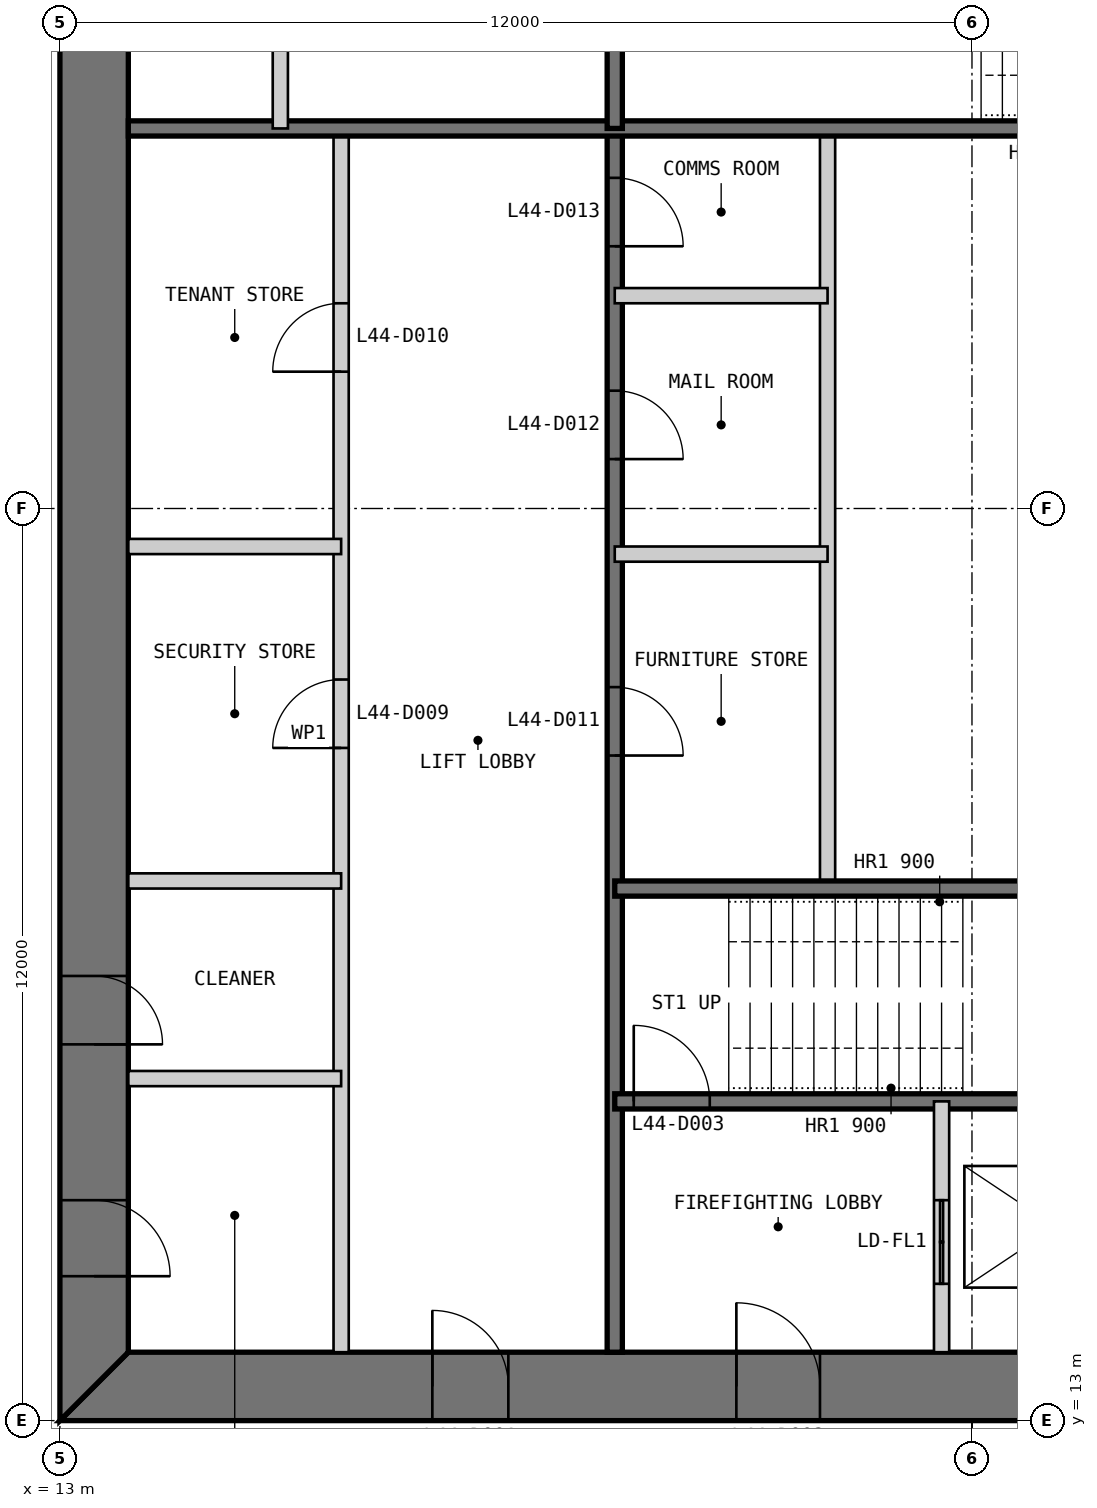
"""IFC4 building model, lengths in metres.
Left out: names, types, materials, properties, quantities, classifications, styles, units other than length and angle.
Written with IfcOpenShell. Run it as: python <this file> out.ifc"""

import sys

from ifc_helpers import new_model, si_unit, direction, frame, frame_2d, origin, place, context, subcontext, project, spatial, polyline, rectangle, outline, extrude, element, fill, save


model = new_model("IFC4")
c1 = context("Model", 3, precision=1e-05, world=origin(), true_north=direction((0.0, 1.0)))
c2 = subcontext(c1, "Body", "Model", "MODEL_VIEW")
j1 = project(units=[si_unit("LENGTHUNIT", "METRE"), si_unit("PLANEANGLEUNIT", "RADIAN")], contexts=[c1])
p1 = place(None, origin())
s1 = spatial("IfcSite", under=j1, at=p1, CompositionType="ELEMENT")
p2 = place(p1, origin())
s2 = spatial("IfcBuilding", under=s1, at=p2, CompositionType="ELEMENT")
p3 = place(p2, frame((0.0, 0.0, 189.8)))
s3 = spatial("IfcBuildingStorey", under=s2, at=p3, CompositionType="ELEMENT", Elevation=189.8)
p4 = place(p3, frame((13.0, 13.45, 0.0), z_axis=(0.0, 0.0, 1.0), x_axis=(1.0, 0.0, 0.0)))
e1 = element("IfcWall", 1, at=p4, inside=s3, PredefinedType="SHEAR", context=c2, shape_type="SweptSolid", body=[
    extrude(outline(polyline([(0.0, -0.45), (24.0, -0.45), (23.1, 0.45), (0.9, 0.45), (0.0, -0.45)])), origin(), (0.0, 0.0, 1.0), 4.0),
])
p5 = place(p4, frame((4.9, 0.0, 0.0)))
e2 = element("IfcOpeningElement", 2, at=p5, cuts=e1, PredefinedType="OPENING", context=c2, shape_type="SweptSolid", body=[
    extrude(rectangle(XDim=1.0, YDim=2.2, at=frame_2d((0.5, 1.1))), frame((0.0, 0.46, 0.0), z_axis=(0.0, -1.0, 0.0), x_axis=(1.0, 0.0, 0.0)), (0.0, 0.0, 1.0), 0.92),
])
p6 = place(p4, frame((8.9, 0.0, 0.0)))
e3 = element("IfcOpeningElement", 3, at=p6, cuts=e1, PredefinedType="OPENING", context=c2, shape_type="SweptSolid", body=[
    extrude(rectangle(XDim=1.1, YDim=2.2, at=frame_2d((0.55, 1.1))), frame((0.0, 0.46, 0.0), z_axis=(0.0, -1.0, 0.0), x_axis=(1.0, 0.0, 0.0)), (0.0, 0.0, 1.0), 0.92),
])
p7 = place(p4, frame((15.05, 0.0, 0.0)))
e4 = element("IfcOpeningElement", 4, at=p7, cuts=e1, PredefinedType="OPENING", context=c2, shape_type="SweptSolid", body=[
    extrude(rectangle(XDim=0.9, YDim=2.2, at=frame_2d((0.45, 1.1))), frame((0.0, 0.46, 0.0), z_axis=(0.0, -1.0, 0.0), x_axis=(1.0, 0.0, 0.0)), (0.0, 0.0, 1.0), 0.92),
])
p8 = place(p4, frame((17.9, 0.0, 0.0)))
e5 = element("IfcOpeningElement", 5, at=p8, cuts=e1, PredefinedType="OPENING", context=c2, shape_type="SweptSolid", body=[
    extrude(rectangle(XDim=1.0, YDim=2.2, at=frame_2d((0.5, 1.1))), frame((0.0, 0.46, 0.0), z_axis=(0.0, -1.0, 0.0), x_axis=(1.0, 0.0, 0.0)), (0.0, 0.0, 1.0), 0.92),
])
p9 = place(p4, frame((21.4, 0.0, 0.0)))
e6 = element("IfcOpeningElement", 6, at=p9, cuts=e1, PredefinedType="OPENING", context=c2, shape_type="SweptSolid", body=[
    extrude(rectangle(XDim=1.0, YDim=2.2, at=frame_2d((0.5, 1.1))), frame((0.0, 0.46, 0.0), z_axis=(0.0, -1.0, 0.0), x_axis=(1.0, 0.0, 0.0)), (0.0, 0.0, 1.0), 0.92),
])
p10 = place(p3, frame((13.45, 36.1, 0.0), z_axis=(0.0, 0.0, 1.0), x_axis=(0.0, -1.0, 0.0)))
e7 = element("IfcWall", 7, at=p10, inside=s3, PredefinedType="SHEAR", context=c2, shape_type="SweptSolid", body=[
    extrude(outline(polyline([(-0.9, -0.45), (23.1, -0.45), (22.2, 0.45), (0.0, 0.45), (-0.9, -0.45)])), origin(), (0.0, 0.0, 1.0), 4.0),
])
p11 = place(p10, frame((20.2, 0.0, 0.0)))
e8 = element("IfcOpeningElement", 8, at=p11, cuts=e7, PredefinedType="OPENING", context=c2, shape_type="SweptSolid", body=[
    extrude(rectangle(XDim=1.0, YDim=2.2, at=frame_2d((0.5, 1.1))), frame((0.0, 0.46, 0.0), z_axis=(0.0, -1.0, 0.0), x_axis=(1.0, 0.0, 0.0)), (0.0, 0.0, 1.0), 0.92),
])
p12 = place(p10, frame((17.25, 0.0, 0.0)))
e9 = element("IfcOpeningElement", 9, at=p12, cuts=e7, PredefinedType="OPENING", context=c2, shape_type="SweptSolid", body=[
    extrude(rectangle(XDim=0.9, YDim=2.2, at=frame_2d((0.45, 1.1))), frame((0.0, 0.46, 0.0), z_axis=(0.0, -1.0, 0.0), x_axis=(1.0, 0.0, 0.0)), (0.0, 0.0, 1.0), 0.92),
])
p13 = place(p3, frame((16.7, 13.9, 0.0), z_axis=(0.0, 0.0, 1.0), x_axis=(0.0, 1.0, 0.0)))
e10 = element("IfcWall", 10, at=p13, inside=s3, PredefinedType="PARTITIONING", context=c2, shape_type="SweptSolid", body=[
    extrude(rectangle(XDim=16.1, YDim=0.2, at=frame_2d((8.05, 0.0))), origin(), (0.0, 0.0, 1.0), 3.8),
])
p14 = place(p13, frame((7.95, 0.0, 0.0)))
e11 = element("IfcOpeningElement", 11, at=p14, cuts=e10, PredefinedType="OPENING", context=c2, shape_type="SweptSolid", body=[
    extrude(rectangle(XDim=0.9, YDim=2.2, at=frame_2d((0.45, 1.1))), frame((0.0, 0.11, 0.0), z_axis=(0.0, -1.0, 0.0), x_axis=(1.0, 0.0, 0.0)), (0.0, 0.0, 1.0), 0.22),
])
p15 = place(p13, frame((12.9, 0.0, 0.0)))
e12 = element("IfcOpeningElement", 12, at=p15, cuts=e10, PredefinedType="OPENING", context=c2, shape_type="SweptSolid", body=[
    extrude(rectangle(XDim=0.9, YDim=2.2, at=frame_2d((0.45, 1.1))), frame((0.0, 0.11, 0.0), z_axis=(0.0, -1.0, 0.0), x_axis=(1.0, 0.0, 0.0)), (0.0, 0.0, 1.0), 0.22),
])
p16 = place(p3, frame((20.3, 13.9, 0.0), z_axis=(0.0, 0.0, 1.0), x_axis=(0.0, 1.0, 0.0)))
e13 = element("IfcWall", 13, at=p16, inside=s3, PredefinedType="SOLIDWALL", context=c2, shape_type="SweptSolid", body=[
    extrude(rectangle(XDim=16.1, YDim=0.2, at=frame_2d((8.05, 0.0))), origin(), (0.0, 0.0, 1.0), 3.8),
])
p17 = place(p16, frame((7.85, 0.0, 0.0)))
e14 = element("IfcOpeningElement", 14, at=p17, cuts=e13, PredefinedType="OPENING", context=c2, shape_type="SweptSolid", body=[
    extrude(rectangle(XDim=0.9, YDim=2.2, at=frame_2d((0.45, 1.1))), frame((0.0, 0.11, 0.0), z_axis=(0.0, -1.0, 0.0), x_axis=(1.0, 0.0, 0.0)), (0.0, 0.0, 1.0), 0.22),
])
p18 = place(p16, frame((11.75, 0.0, 0.0)))
e15 = element("IfcOpeningElement", 15, at=p18, cuts=e13, PredefinedType="OPENING", context=c2, shape_type="SweptSolid", body=[
    extrude(rectangle(XDim=0.9, YDim=2.2, at=frame_2d((0.45, 1.1))), frame((0.0, 0.11, 0.0), z_axis=(0.0, -1.0, 0.0), x_axis=(1.0, 0.0, 0.0)), (0.0, 0.0, 1.0), 0.22),
])
p19 = place(p16, frame((14.55, 0.0, 0.0)))
e16 = element("IfcOpeningElement", 16, at=p19, cuts=e13, PredefinedType="OPENING", context=c2, shape_type="SweptSolid", body=[
    extrude(rectangle(XDim=0.9, YDim=2.2, at=frame_2d((0.45, 1.1))), frame((0.0, 0.11, 0.0), z_axis=(0.0, -1.0, 0.0), x_axis=(1.0, 0.0, 0.0)), (0.0, 0.0, 1.0), 0.22),
])
p20 = place(p3, frame((23.1, 20.0, 0.0), z_axis=(0.0, 0.0, 1.0), x_axis=(0.0, 1.0, 0.0)))
e17 = element("IfcWall", 17, at=p20, inside=s3, PredefinedType="PARTITIONING", context=c2, shape_type="SweptSolid", body=[
    extrude(rectangle(XDim=10.0, YDim=0.2, at=frame_2d((5.0, 0.0))), origin(), (0.0, 0.0, 1.0), 3.8),
])
p21 = place(p3, frame((20.3, 17.2, 0.0), z_axis=(0.0, 0.0, 1.0), x_axis=(1.0, 0.0, 0.0)))
e18 = element("IfcWall", 18, at=p21, inside=s3, PredefinedType="SOLIDWALL", context=c2, shape_type="SweptSolid", body=[
    extrude(rectangle(XDim=9.4, YDim=0.2, at=frame_2d((4.7, 0.0))), origin(), (0.0, 0.0, 1.0), 3.8),
])
p22 = place(p21, frame((0.25, 0.0, 0.0)))
e19 = element("IfcOpeningElement", 19, at=p22, cuts=e18, PredefinedType="OPENING", context=c2, shape_type="SweptSolid", body=[
    extrude(rectangle(XDim=1.0, YDim=2.2, at=frame_2d((0.5, 1.1))), frame((0.0, 0.11, 0.0), z_axis=(0.0, -1.0, 0.0), x_axis=(1.0, 0.0, 0.0)), (0.0, 0.0, 1.0), 0.22),
])
p23 = place(p3, frame((20.3, 20.0, 0.0), z_axis=(0.0, 0.0, 1.0), x_axis=(1.0, 0.0, 0.0)))
e20 = element("IfcWall", 20, at=p23, inside=s3, PredefinedType="SOLIDWALL", context=c2, shape_type="SweptSolid", body=[
    extrude(rectangle(XDim=15.8, YDim=0.2, at=frame_2d((7.9, 0.0))), origin(), (0.0, 0.0, 1.0), 3.8),
])
p24 = place(p3, frame((24.6, 13.9, 0.0), z_axis=(0.0, 0.0, 1.0), x_axis=(0.0, 1.0, 0.0)))
e21 = element("IfcWall", 21, at=p24, inside=s3, PredefinedType="PARTITIONING", context=c2, shape_type="SweptSolid", body=[
    extrude(rectangle(XDim=3.3, YDim=0.2, at=frame_2d((1.65, 0.0))), origin(), (0.0, 0.0, 1.0), 3.8),
])
p25 = place(p24, frame((0.9, 0.0, 0.0)))
e22 = element("IfcOpeningElement", 22, at=p25, cuts=e21, PredefinedType="OPENING", context=c2, shape_type="SweptSolid", body=[
    extrude(rectangle(XDim=1.1, YDim=2.2, at=frame_2d((0.55, 1.1))), frame((0.0, 0.11, 0.0), z_axis=(0.0, -1.0, 0.0), x_axis=(1.0, 0.0, 0.0)), (0.0, 0.0, 1.0), 0.22),
])
for number, where, z_axis, x_axis in (
    (23, (13.9, 17.5, 0.0), (0.0, 0.0, 1.0), (1.0, 0.0, 0.0)),
    (24, (13.9, 20.1, 0.0), (0.0, 0.0, 1.0), (1.0, 0.0, 0.0)),
    (25, (13.9, 24.5, 0.0), (0.0, 0.0, 1.0), (1.0, 0.0, 0.0)),
    (26, (20.3, 24.4, 0.0), (0.0, 0.0, 1.0), (1.0, 0.0, 0.0)),
    (27, (20.3, 27.8, 0.0), (0.0, 0.0, 1.0), (1.0, 0.0, 0.0)),
):
    element("IfcWall", number, at=place(p3, frame(where, z_axis=z_axis, x_axis=x_axis)), inside=s3, PredefinedType="PARTITIONING", context=c2, shape_type="SweptSolid", body=[
        extrude(rectangle(XDim=2.8, YDim=0.2, at=frame_2d((1.4, 0.0))), origin(), (0.0, 0.0, 1.0), 3.8),
    ])
p26 = place(p3, frame((29.7, 30.0, 0.0), z_axis=(0.0, 0.0, 1.0), x_axis=(-1.0, 0.0, 0.0)))
e28 = element("IfcWall", 28, at=p26, inside=s3, PredefinedType="SOLIDWALL", context=c2, shape_type="SweptSolid", body=[
    extrude(rectangle(XDim=15.8, YDim=0.2, at=frame_2d((7.9, 0.0))), origin(), (0.0, 0.0, 1.0), 3.8),
])
p27 = place(p3, frame((20.3, 36.1, 0.0), z_axis=(0.0, 0.0, 1.0), x_axis=(0.0, -1.0, 0.0)))
e29 = element("IfcWall", 29, at=p27, inside=s3, PredefinedType="SOLIDWALL", context=c2, shape_type="SweptSolid", body=[
    extrude(rectangle(XDim=6.1, YDim=0.2, at=frame_2d((3.05, 0.0))), origin(), (0.0, 0.0, 1.0), 3.8),
])
p28 = place(p3, frame((15.9, 36.1, 0.0), z_axis=(0.0, 0.0, 1.0), x_axis=(0.0, -1.0, 0.0)))
e30 = element("IfcWall", 30, at=p28, inside=s3, PredefinedType="PARTITIONING", context=c2, shape_type="SweptSolid", body=[
    extrude(rectangle(XDim=6.1, YDim=0.2, at=frame_2d((3.05, 0.0))), origin(), (0.0, 0.0, 1.0), 3.8),
])
p29 = place(p5, origin())
e31 = element("IfcDoor", 31, at=p29, inside=s3, OperationType="SINGLE_SWING_LEFT", PredefinedType="DOOR", context=c2, shape_type="SweptSolid", body=[
    extrude(rectangle(XDim=1.0, YDim=2.2, at=frame_2d((0.5, 1.1))), frame((0.0, 0.025, 0.0), z_axis=(0.0, -1.0, 0.0), x_axis=(1.0, 0.0, 0.0)), (0.0, 0.0, 1.0), 0.05),
    extrude(outline(polyline([(0.0, 0.0), (0.04, 0.0), (0.04, 2.16), (0.96, 2.16), (0.96, 0.0), (1.0, 0.0), (1.0, 2.2), (0.0, 2.2), (0.0, 0.0)])), frame((0.0, 0.3, 0.0), z_axis=(0.0, -1.0, 0.0), x_axis=(1.0, 0.0, 0.0)), (0.0, 0.0, 1.0), 0.6),
])
fill(e2, e31)
p30 = place(p6, origin())
e32 = element("IfcDoor", 32, at=p30, inside=s3, OperationType="SINGLE_SWING_LEFT", PredefinedType="DOOR", context=c2, shape_type="SweptSolid", body=[
    extrude(rectangle(XDim=1.1, YDim=2.2, at=frame_2d((0.55, 1.1))), frame((0.0, 0.025, 0.0), z_axis=(0.0, -1.0, 0.0), x_axis=(1.0, 0.0, 0.0)), (0.0, 0.0, 1.0), 0.05),
    extrude(outline(polyline([(0.0, 0.0), (0.04, 0.0), (0.04, 2.16), (1.06, 2.16), (1.06, 0.0), (1.1, 0.0), (1.1, 2.2), (0.0, 2.2), (0.0, 0.0)])), frame((0.0, 0.3, 0.0), z_axis=(0.0, -1.0, 0.0), x_axis=(1.0, 0.0, 0.0)), (0.0, 0.0, 1.0), 0.6),
])
fill(e3, e32)
p31 = place(p22, origin())
e33 = element("IfcDoor", 33, at=p31, inside=s3, OperationType="SINGLE_SWING_LEFT", PredefinedType="DOOR", context=c2, shape_type="SweptSolid", body=[
    extrude(rectangle(XDim=1.0, YDim=2.2, at=frame_2d((0.5, 1.1))), frame((0.0, 0.025, 0.0), z_axis=(0.0, -1.0, 0.0), x_axis=(1.0, 0.0, 0.0)), (0.0, 0.0, 1.0), 0.05),
])
fill(e19, e33)
p32 = place(p11, origin())
e34 = element("IfcDoor", 34, at=p32, inside=s3, OperationType="SINGLE_SWING_RIGHT", PredefinedType="DOOR", context=c2, shape_type="SweptSolid", body=[
    extrude(rectangle(XDim=1.0, YDim=2.2, at=frame_2d((0.5, 1.1))), frame((0.0, 0.025, 0.0), z_axis=(0.0, -1.0, 0.0), x_axis=(1.0, 0.0, 0.0)), (0.0, 0.0, 1.0), 0.05),
    extrude(outline(polyline([(0.0, 0.0), (0.04, 0.0), (0.04, 2.16), (0.96, 2.16), (0.96, 0.0), (1.0, 0.0), (1.0, 2.2), (0.0, 2.2), (0.0, 0.0)])), frame((0.0, 0.3, 0.0), z_axis=(0.0, -1.0, 0.0), x_axis=(1.0, 0.0, 0.0)), (0.0, 0.0, 1.0), 0.6),
])
fill(e8, e34)
p33 = place(p12, origin())
e35 = element("IfcDoor", 35, at=p33, inside=s3, OperationType="SINGLE_SWING_RIGHT", PredefinedType="DOOR", context=c2, shape_type="SweptSolid", body=[
    extrude(rectangle(XDim=0.9, YDim=2.2, at=frame_2d((0.45, 1.1))), frame((0.0, 0.025, 0.0), z_axis=(0.0, -1.0, 0.0), x_axis=(1.0, 0.0, 0.0)), (0.0, 0.0, 1.0), 0.05),
    extrude(outline(polyline([(0.0, 0.0), (0.04, 0.0), (0.04, 2.16), (0.86, 2.16), (0.86, 0.0), (0.9, 0.0), (0.9, 2.2), (0.0, 2.2), (0.0, 0.0)])), frame((0.0, 0.3, 0.0), z_axis=(0.0, -1.0, 0.0), x_axis=(1.0, 0.0, 0.0)), (0.0, 0.0, 1.0), 0.6),
])
fill(e9, e35)
p34 = place(p14, origin())
e36 = element("IfcDoor", 36, at=p34, inside=s3, OperationType="SINGLE_SWING_LEFT", PredefinedType="DOOR", context=c2, shape_type="SweptSolid", body=[
    extrude(rectangle(XDim=0.9, YDim=2.2, at=frame_2d((0.45, 1.1))), frame((0.0, 0.025, 0.0), z_axis=(0.0, -1.0, 0.0), x_axis=(1.0, 0.0, 0.0)), (0.0, 0.0, 1.0), 0.05),
])
fill(e11, e36)
p35 = place(p15, origin())
e37 = element("IfcDoor", 37, at=p35, inside=s3, OperationType="SINGLE_SWING_LEFT", PredefinedType="DOOR", context=c2, shape_type="SweptSolid", body=[
    extrude(rectangle(XDim=0.9, YDim=2.2, at=frame_2d((0.45, 1.1))), frame((0.0, 0.025, 0.0), z_axis=(0.0, -1.0, 0.0), x_axis=(1.0, 0.0, 0.0)), (0.0, 0.0, 1.0), 0.05),
])
fill(e12, e37)
p36 = place(p17, frame((0.9, 0.0, 0.0), z_axis=(0.0, 0.0, 1.0), x_axis=(-1.0, 0.0, 0.0)))
e38 = element("IfcDoor", 38, at=p36, inside=s3, OperationType="SINGLE_SWING_RIGHT", PredefinedType="DOOR", context=c2, shape_type="SweptSolid", body=[
    extrude(rectangle(XDim=0.9, YDim=2.2, at=frame_2d((0.45, 1.1))), frame((0.0, 0.025, 0.0), z_axis=(0.0, -1.0, 0.0), x_axis=(1.0, 0.0, 0.0)), (0.0, 0.0, 1.0), 0.05),
])
fill(e14, e38)
p37 = place(p18, frame((0.9, 0.0, 0.0), z_axis=(0.0, 0.0, 1.0), x_axis=(-1.0, 0.0, 0.0)))
e39 = element("IfcDoor", 39, at=p37, inside=s3, OperationType="SINGLE_SWING_RIGHT", PredefinedType="DOOR", context=c2, shape_type="SweptSolid", body=[
    extrude(rectangle(XDim=0.9, YDim=2.2, at=frame_2d((0.45, 1.1))), frame((0.0, 0.025, 0.0), z_axis=(0.0, -1.0, 0.0), x_axis=(1.0, 0.0, 0.0)), (0.0, 0.0, 1.0), 0.05),
])
fill(e15, e39)
p38 = place(p19, frame((0.9, 0.0, 0.0), z_axis=(0.0, 0.0, 1.0), x_axis=(-1.0, 0.0, 0.0)))
e40 = element("IfcDoor", 40, at=p38, inside=s3, OperationType="SINGLE_SWING_RIGHT", PredefinedType="DOOR", context=c2, shape_type="SweptSolid", body=[
    extrude(rectangle(XDim=0.9, YDim=2.2, at=frame_2d((0.45, 1.1))), frame((0.0, 0.025, 0.0), z_axis=(0.0, -1.0, 0.0), x_axis=(1.0, 0.0, 0.0)), (0.0, 0.0, 1.0), 0.05),
])
fill(e16, e40)
p39 = place(p25, origin())
e41 = element("IfcDoor", 41, at=p39, inside=s3, OperationType="DOUBLE_DOOR_SLIDING", PredefinedType="DOOR", context=c2, shape_type="SweptSolid", body=[
    extrude(rectangle(XDim=1.1, YDim=2.2, at=frame_2d((0.55, 1.1))), frame((0.0, 0.025, 0.0), z_axis=(0.0, -1.0, 0.0), x_axis=(1.0, 0.0, 0.0)), (0.0, 0.0, 1.0), 0.05),
])
fill(e22, e41)
save(model, sys.argv[1])
